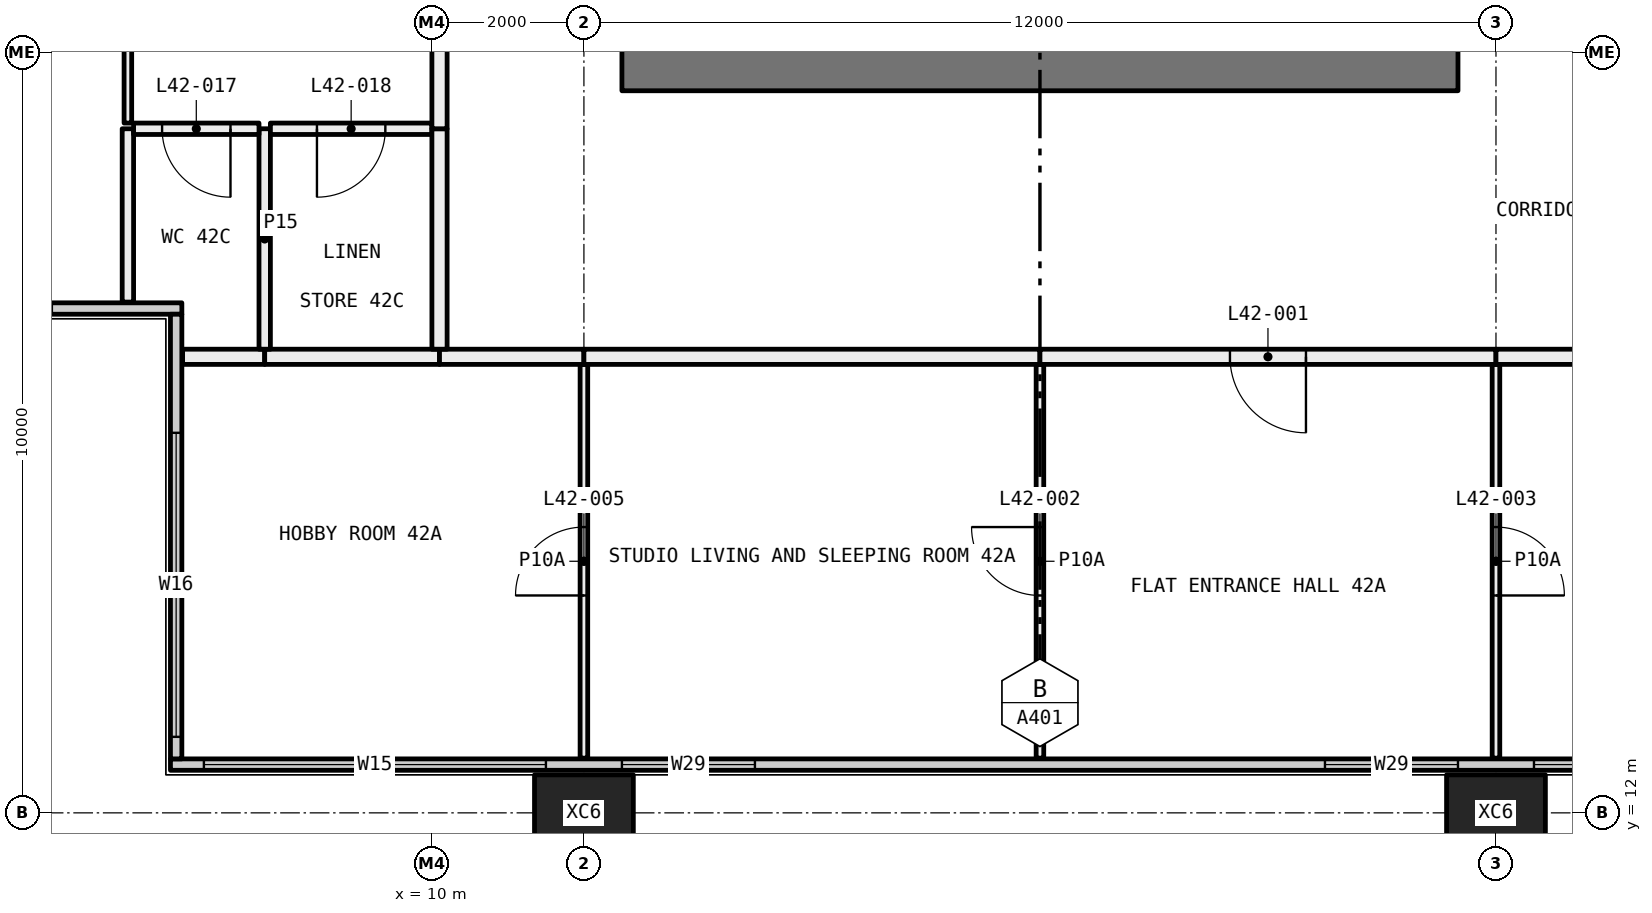
"""IFC4 building model, lengths in metres.
Left out: names, types, materials, properties, quantities, classifications, styles, units other than length and angle.
Written with IfcOpenShell. Run it as: python <this file> out.ifc"""

import sys

from ifc_helpers import new_model, si_unit, direction, frame, frame_2d, origin, origin_2d, place, context, subcontext, project, spatial, rectangle, hollow_rectangle, extrude, element, fill, save


model = new_model("IFC4")
c1 = context("Model", 3, precision=1e-05, world=origin(), true_north=direction((0.0, 1.0)))
c2 = subcontext(c1, "Body", "Model", "MODEL_VIEW")
j1 = project(units=[si_unit("LENGTHUNIT", "METRE"), si_unit("PLANEANGLEUNIT", "RADIAN")], contexts=[c1])
p1 = place(None, origin())
s1 = spatial("IfcSite", under=j1, at=p1, CompositionType="ELEMENT")
p2 = place(p1, origin())
s2 = spatial("IfcBuilding", under=s1, at=p2, CompositionType="ELEMENT")
p3 = place(p2, frame((0.0, 0.0, 161.7)))
s3 = spatial("IfcBuildingStorey", under=s2, at=p3, CompositionType="ELEMENT", Elevation=161.7)
for number, where, z_axis, x_axis in (
    (1, (12.0, 12.0, -0.4), (0.0, 0.0, 1.0), (1.0, 0.0, 0.0)),
    (2, (24.0, 12.0, -0.4), (0.0, 0.0, 1.0), (1.0, 0.0, 0.0)),
):
    element("IfcColumn", number, at=place(p3, frame(where, z_axis=z_axis, x_axis=x_axis)), inside=s3, PredefinedType="COLUMN", context=c2, shape_type="SweptSolid", body=[
        extrude(hollow_rectangle(XDim=1.3, YDim=1.0, WallThickness=0.05, at=origin_2d()), origin(), (0.0, 0.0, 1.0), 3.45),
    ])
p4 = place(p3, frame((6.56, 12.635, 0.0), z_axis=(0.0, 0.0, 1.0), x_axis=(1.0, 0.0, 0.0)))
e3 = element("IfcWall", 3, at=p4, inside=s3, PredefinedType="ELEMENTEDWALL", context=c2, shape_type="SweptSolid", body=[
    extrude(rectangle(XDim=46.88, YDim=0.15, at=frame_2d((23.44, 0.0))), origin(), (0.0, 0.0, 1.0), 3.05),
])
p5 = place(p4, frame((0.44, 0.0, 0.45)))
e4 = element("IfcOpeningElement", 4, at=p5, cuts=e3, PredefinedType="OPENING", context=c2, shape_type="SweptSolid", body=[
    extrude(rectangle(XDim=4.5, YDim=2.55, at=frame_2d((2.25, 1.275))), frame((0.0, 0.085, 0.0), z_axis=(0.0, -1.0, 0.0), x_axis=(1.0, 0.0, 0.0)), (0.0, 0.0, 1.0), 0.17),
])
p6 = place(p4, frame((5.94, 0.0, 0.45)))
e5 = element("IfcOpeningElement", 5, at=p6, cuts=e3, PredefinedType="OPENING", context=c2, shape_type="SweptSolid", body=[
    extrude(rectangle(XDim=1.75, YDim=2.55, at=frame_2d((0.875, 1.275))), frame((0.0, 0.085, 0.0), z_axis=(0.0, -1.0, 0.0), x_axis=(1.0, 0.0, 0.0)), (0.0, 0.0, 1.0), 0.17),
])
p7 = place(p4, frame((15.19, 0.0, 0.45)))
e6 = element("IfcOpeningElement", 6, at=p7, cuts=e3, PredefinedType="OPENING", context=c2, shape_type="SweptSolid", body=[
    extrude(rectangle(XDim=1.75, YDim=2.55, at=frame_2d((0.875, 1.275))), frame((0.0, 0.085, 0.0), z_axis=(0.0, -1.0, 0.0), x_axis=(1.0, 0.0, 0.0)), (0.0, 0.0, 1.0), 0.17),
])
p8 = place(p4, frame((17.94, 0.0, 0.45)))
e7 = element("IfcOpeningElement", 7, at=p8, cuts=e3, PredefinedType="OPENING", context=c2, shape_type="SweptSolid", body=[
    extrude(rectangle(XDim=1.75, YDim=2.55, at=frame_2d((0.875, 1.275))), frame((0.0, 0.085, 0.0), z_axis=(0.0, -1.0, 0.0), x_axis=(1.0, 0.0, 0.0)), (0.0, 0.0, 1.0), 0.17),
])
p9 = place(p4, frame((27.19, 0.0, 0.45)))
e8 = element("IfcOpeningElement", 8, at=p9, cuts=e3, PredefinedType="OPENING", context=c2, shape_type="SweptSolid", body=[
    extrude(rectangle(XDim=1.75, YDim=2.55, at=frame_2d((0.875, 1.275))), frame((0.0, 0.085, 0.0), z_axis=(0.0, -1.0, 0.0), x_axis=(1.0, 0.0, 0.0)), (0.0, 0.0, 1.0), 0.17),
])
p10 = place(p4, frame((29.94, 0.0, 0.45)))
e9 = element("IfcOpeningElement", 9, at=p10, cuts=e3, PredefinedType="OPENING", context=c2, shape_type="SweptSolid", body=[
    extrude(rectangle(XDim=1.75, YDim=2.55, at=frame_2d((0.875, 1.275))), frame((0.0, 0.085, 0.0), z_axis=(0.0, -1.0, 0.0), x_axis=(1.0, 0.0, 0.0)), (0.0, 0.0, 1.0), 0.17),
])
p11 = place(p4, frame((39.19, 0.0, 0.45)))
e10 = element("IfcOpeningElement", 10, at=p11, cuts=e3, PredefinedType="OPENING", context=c2, shape_type="SweptSolid", body=[
    extrude(rectangle(XDim=1.75, YDim=2.55, at=frame_2d((0.875, 1.275))), frame((0.0, 0.085, 0.0), z_axis=(0.0, -1.0, 0.0), x_axis=(1.0, 0.0, 0.0)), (0.0, 0.0, 1.0), 0.17),
])
p12 = place(p4, frame((41.94, 0.0, 0.45)))
e11 = element("IfcOpeningElement", 11, at=p12, cuts=e3, PredefinedType="OPENING", context=c2, shape_type="SweptSolid", body=[
    extrude(rectangle(XDim=4.5, YDim=2.55, at=frame_2d((2.25, 1.275))), frame((0.0, 0.085, 0.0), z_axis=(0.0, -1.0, 0.0), x_axis=(1.0, 0.0, 0.0)), (0.0, 0.0, 1.0), 0.17),
])
p13 = place(p3, frame((0.56, 18.635, 0.0), z_axis=(0.0, 0.0, 1.0), x_axis=(1.0, 0.0, 0.0)))
e12 = element("IfcWall", 12, at=p13, inside=s3, PredefinedType="ELEMENTEDWALL", context=c2, shape_type="SweptSolid", body=[
    extrude(rectangle(XDim=6.15, YDim=0.15, at=frame_2d((3.075, 0.0))), origin(), (0.0, 0.0, 1.0), 3.05),
])
p14 = place(p13, frame((0.44, 0.0, 0.45)))
e13 = element("IfcOpeningElement", 13, at=p14, cuts=e12, PredefinedType="OPENING", context=c2, shape_type="SweptSolid", body=[
    extrude(rectangle(XDim=4.0, YDim=2.55, at=frame_2d((2.0, 1.275))), frame((0.0, 0.085, 0.0), z_axis=(0.0, -1.0, 0.0), x_axis=(1.0, 0.0, 0.0)), (0.0, 0.0, 1.0), 0.17),
])
p15 = place(p3, frame((6.635, 12.71, 0.0), z_axis=(0.0, 0.0, 1.0), x_axis=(0.0, 1.0, 0.0)))
e14 = element("IfcWall", 14, at=p15, inside=s3, PredefinedType="ELEMENTEDWALL", context=c2, shape_type="SweptSolid", body=[
    extrude(rectangle(XDim=5.85, YDim=0.15, at=frame_2d((2.925, 0.0))), origin(), (0.0, 0.0, 1.0), 3.05),
])
p16 = place(p15, frame((0.29, 0.0, 0.45)))
e15 = element("IfcOpeningElement", 15, at=p16, cuts=e14, PredefinedType="OPENING", context=c2, shape_type="SweptSolid", body=[
    extrude(rectangle(XDim=4.0, YDim=2.55, at=frame_2d((2.0, 1.275))), frame((0.0, 0.085, 0.0), z_axis=(0.0, -1.0, 0.0), x_axis=(1.0, 0.0, 0.0)), (0.0, 0.0, 1.0), 0.17),
])
p17 = place(p3, frame((12.0, 12.72, 0.0), z_axis=(0.0, 0.0, 1.0), x_axis=(0.0, 1.0, 0.0)))
e16 = element("IfcWall", 16, at=p17, inside=s3, PredefinedType="PARTITIONING", context=c2, shape_type="SweptSolid", body=[
    extrude(rectangle(XDim=5.18, YDim=0.1, at=frame_2d((2.59, 0.0))), origin(), (0.0, 0.0, 1.0), 3.05),
])
p18 = place(p17, frame((2.14, 0.0, 0.0)))
e17 = element("IfcOpeningElement", 17, at=p18, cuts=e16, PredefinedType="OPENING", context=c2, shape_type="SweptSolid", body=[
    extrude(rectangle(XDim=0.9, YDim=2.1, at=frame_2d((0.45, 1.05))), frame((0.0, 0.06, 0.0), z_axis=(0.0, -1.0, 0.0), x_axis=(1.0, 0.0, 0.0)), (0.0, 0.0, 1.0), 0.12),
])
p19 = place(p3, frame((7.8, 18.0, 0.0), z_axis=(0.0, 0.0, 1.0), x_axis=(-1.0, 0.0, 0.0)))
e18 = element("IfcWall", 18, at=p19, inside=s3, PredefinedType="PARTITIONING", context=c2, shape_type="SweptSolid", body=[
    extrude(rectangle(XDim=1.08, YDim=0.2, at=frame_2d((0.54, 0.0))), origin(), (0.0, 0.0, 1.0), 3.05),
])
p20 = place(p3, frame((10.1, 18.0, 0.0), z_axis=(0.0, 0.0, 1.0), x_axis=(-1.0, 0.0, 0.0)))
e19 = element("IfcWall", 19, at=p20, inside=s3, PredefinedType="PARTITIONING", context=c2, shape_type="SweptSolid", body=[
    extrude(rectangle(XDim=2.3, YDim=0.2, at=frame_2d((1.15, 0.0))), origin(), (0.0, 0.0, 1.0), 3.05),
])
p21 = place(p3, frame((12.0, 18.0, 0.0), z_axis=(0.0, 0.0, 1.0), x_axis=(-1.0, 0.0, 0.0)))
e20 = element("IfcWall", 20, at=p21, inside=s3, PredefinedType="PARTITIONING", context=c2, shape_type="SweptSolid", body=[
    extrude(rectangle(XDim=1.9, YDim=0.2, at=frame_2d((0.95, 0.0))), origin(), (0.0, 0.0, 1.0), 3.05),
])
p22 = place(p3, frame((18.0, 12.72, 0.0), z_axis=(0.0, 0.0, 1.0), x_axis=(0.0, 1.0, 0.0)))
e21 = element("IfcWall", 21, at=p22, inside=s3, PredefinedType="PARTITIONING", context=c2, shape_type="SweptSolid", body=[
    extrude(rectangle(XDim=5.18, YDim=0.1, at=frame_2d((2.59, 0.0))), origin(), (0.0, 0.0, 1.0), 3.05),
])
p23 = place(p22, frame((2.14, 0.0, 0.0)))
e22 = element("IfcOpeningElement", 22, at=p23, cuts=e21, PredefinedType="OPENING", context=c2, shape_type="SweptSolid", body=[
    extrude(rectangle(XDim=0.9, YDim=2.1, at=frame_2d((0.45, 1.05))), frame((0.0, 0.06, 0.0), z_axis=(0.0, -1.0, 0.0), x_axis=(1.0, 0.0, 0.0)), (0.0, 0.0, 1.0), 0.12),
])
p24 = place(p3, frame((18.0, 18.0, 0.0), z_axis=(0.0, 0.0, 1.0), x_axis=(-1.0, 0.0, 0.0)))
e23 = element("IfcWall", 23, at=p24, inside=s3, PredefinedType="PARTITIONING", context=c2, shape_type="SweptSolid", body=[
    extrude(rectangle(XDim=6.0, YDim=0.2, at=frame_2d((3.0, 0.0))), origin(), (0.0, 0.0, 1.0), 3.05),
])
p25 = place(p3, frame((24.0, 12.72, 0.0), z_axis=(0.0, 0.0, 1.0), x_axis=(0.0, 1.0, 0.0)))
e24 = element("IfcWall", 24, at=p25, inside=s3, PredefinedType="PARTITIONING", context=c2, shape_type="SweptSolid", body=[
    extrude(rectangle(XDim=5.18, YDim=0.1, at=frame_2d((2.59, 0.0))), origin(), (0.0, 0.0, 1.0), 3.05),
])
p26 = place(p25, frame((2.14, 0.0, 0.0)))
e25 = element("IfcOpeningElement", 25, at=p26, cuts=e24, PredefinedType="OPENING", context=c2, shape_type="SweptSolid", body=[
    extrude(rectangle(XDim=0.9, YDim=2.1, at=frame_2d((0.45, 1.05))), frame((0.0, 0.06, 0.0), z_axis=(0.0, -1.0, 0.0), x_axis=(1.0, 0.0, 0.0)), (0.0, 0.0, 1.0), 0.12),
])
p27 = place(p3, frame((24.0, 18.0, 0.0), z_axis=(0.0, 0.0, 1.0), x_axis=(-1.0, 0.0, 0.0)))
e26 = element("IfcWall", 26, at=p27, inside=s3, PredefinedType="PARTITIONING", context=c2, shape_type="SweptSolid", body=[
    extrude(rectangle(XDim=6.0, YDim=0.2, at=frame_2d((3.0, 0.0))), origin(), (0.0, 0.0, 1.0), 3.05),
])
p28 = place(p27, frame((2.5, 0.0, 0.0)))
e27 = element("IfcOpeningElement", 27, at=p28, cuts=e26, PredefinedType="OPENING", context=c2, shape_type="SweptSolid", body=[
    extrude(rectangle(XDim=1.0, YDim=2.1, at=frame_2d((0.5, 1.05))), frame((0.0, 0.11, 0.0), z_axis=(0.0, -1.0, 0.0), x_axis=(1.0, 0.0, 0.0)), (0.0, 0.0, 1.0), 0.22),
])
p29 = place(p3, frame((30.0, 18.0, 0.0), z_axis=(0.0, 0.0, 1.0), x_axis=(-1.0, 0.0, 0.0)))
e28 = element("IfcWall", 28, at=p29, inside=s3, PredefinedType="PARTITIONING", context=c2, shape_type="SweptSolid", body=[
    extrude(rectangle(XDim=6.0, YDim=0.2, at=frame_2d((3.0, 0.0))), origin(), (0.0, 0.0, 1.0), 3.05),
])
p30 = place(p3, frame((6.0, 18.72, 0.0), z_axis=(0.0, 0.0, 1.0), x_axis=(0.0, 1.0, 0.0)))
e29 = element("IfcWall", 29, at=p30, inside=s3, PredefinedType="PARTITIONING", context=c2, shape_type="SweptSolid", body=[
    extrude(rectangle(XDim=2.28, YDim=0.15, at=frame_2d((1.14, 0.0))), origin(), (0.0, 0.0, 1.0), 3.05),
])
p31 = place(p3, frame((6.0, 21.075, 0.0), z_axis=(0.0, 0.0, 1.0), x_axis=(0.0, 1.0, 0.0)))
e30 = element("IfcWall", 30, at=p31, inside=s3, PredefinedType="PARTITIONING", context=c2, shape_type="SweptSolid", body=[
    extrude(rectangle(XDim=2.875, YDim=0.1, at=frame_2d((1.438, 0.0))), origin(), (0.0, 0.0, 1.0), 2.45),
])
p32 = place(p3, frame((7.8, 18.1, 0.0), z_axis=(0.0, 0.0, 1.0), x_axis=(0.0, 1.0, 0.0)))
e31 = element("IfcWall", 31, at=p32, inside=s3, PredefinedType="PARTITIONING", context=c2, shape_type="SweptSolid", body=[
    extrude(rectangle(XDim=2.9, YDim=0.15, at=frame_2d((1.45, 0.0))), origin(), (0.0, 0.0, 1.0), 3.05),
])
p33 = place(p3, frame((7.725, 21.0, 0.0), z_axis=(0.0, 0.0, 1.0), x_axis=(-1.0, 0.0, 0.0)))
e32 = element("IfcWall", 32, at=p33, inside=s3, PredefinedType="PARTITIONING", context=c2, shape_type="SweptSolid", body=[
    extrude(rectangle(XDim=1.65, YDim=0.15, at=frame_2d((0.825, 0.0))), origin(), (0.0, 0.0, 1.0), 3.05),
])
p34 = place(p33, frame((0.375, 0.0, 0.0)))
e33 = element("IfcOpeningElement", 33, at=p34, cuts=e32, PredefinedType="OPENING", context=c2, shape_type="SweptSolid", body=[
    extrude(rectangle(XDim=0.9, YDim=2.1, at=frame_2d((0.45, 1.05))), frame((0.0, 0.085, 0.0), z_axis=(0.0, -1.0, 0.0), x_axis=(1.0, 0.0, 0.0)), (0.0, 0.0, 1.0), 0.17),
])
p35 = place(p3, frame((10.0, 21.0, 0.0), z_axis=(0.0, 0.0, 1.0), x_axis=(-1.0, 0.0, 0.0)))
e34 = element("IfcWall", 34, at=p35, inside=s3, PredefinedType="PARTITIONING", context=c2, shape_type="SweptSolid", body=[
    extrude(rectangle(XDim=2.125, YDim=0.15, at=frame_2d((1.062, 0.0))), origin(), (0.0, 0.0, 1.0), 3.05),
])
p36 = place(p35, frame((0.613, 0.0, 0.0)))
e35 = element("IfcOpeningElement", 35, at=p36, cuts=e34, PredefinedType="OPENING", context=c2, shape_type="SweptSolid", body=[
    extrude(rectangle(XDim=0.9, YDim=2.1, at=frame_2d((0.45, 1.05))), frame((0.0, 0.085, 0.0), z_axis=(0.0, -1.0, 0.0), x_axis=(1.0, 0.0, 0.0)), (0.0, 0.0, 1.0), 0.17),
])
p37 = place(p3, frame((10.1, 18.1, 0.0), z_axis=(0.0, 0.0, 1.0), x_axis=(0.0, 1.0, 0.0)))
e36 = element("IfcWall", 36, at=p37, inside=s3, PredefinedType="PARTITIONING", context=c2, shape_type="SweptSolid", body=[
    extrude(rectangle(XDim=2.9, YDim=0.2, at=frame_2d((1.45, 0.0))), origin(), (0.0, 0.0, 1.0), 3.05),
])
p38 = place(p3, frame((10.1, 21.0, 0.0), z_axis=(0.0, 0.0, 1.0), x_axis=(0.0, 1.0, 0.0)))
e37 = element("IfcWall", 37, at=p38, inside=s3, PredefinedType="PARTITIONING", context=c2, shape_type="SweptSolid", body=[
    extrude(rectangle(XDim=3.1, YDim=0.2, at=frame_2d((1.55, 0.0))), origin(), (0.0, 0.0, 1.0), 2.45),
])
p39 = place(p38, frame((1.05, 0.0, 0.0)))
e38 = element("IfcOpeningElement", 38, at=p39, cuts=e37, PredefinedType="OPENING", context=c2, shape_type="SweptSolid", body=[
    extrude(rectangle(XDim=1.0, YDim=2.1, at=frame_2d((0.5, 1.05))), frame((0.0, 0.11, 0.0), z_axis=(0.0, -1.0, 0.0), x_axis=(1.0, 0.0, 0.0)), (0.0, 0.0, 1.0), 0.22),
])
p40 = place(p3, frame((12.5, 21.775, 0.0), z_axis=(0.0, 0.0, 1.0), x_axis=(1.0, 0.0, 0.0)))
e39 = element("IfcWall", 39, at=p40, inside=s3, PredefinedType="SHEAR", context=c2, shape_type="SweptSolid", body=[
    extrude(rectangle(XDim=11.0, YDim=0.55, at=frame_2d((5.5, 0.0))), origin(), (0.0, 0.0, 1.0), 3.05),
])
p41 = place(p5, origin())
e40 = element("IfcWindow", 40, at=p41, inside=s3, PartitioningType="SINGLE_PANEL", PredefinedType="WINDOW", context=c2, shape_type="SweptSolid", body=[
    extrude(rectangle(XDim=4.5, YDim=2.55, at=frame_2d((2.25, 1.275))), frame((0.0, 0.03, 0.0), z_axis=(0.0, -1.0, 0.0), x_axis=(1.0, 0.0, 0.0)), (0.0, 0.0, 1.0), 0.06),
])
fill(e4, e40)
p42 = place(p6, origin())
e41 = element("IfcWindow", 41, at=p42, inside=s3, PartitioningType="SINGLE_PANEL", PredefinedType="WINDOW", context=c2, shape_type="SweptSolid", body=[
    extrude(rectangle(XDim=1.75, YDim=2.55, at=frame_2d((0.875, 1.275))), frame((0.0, 0.03, 0.0), z_axis=(0.0, -1.0, 0.0), x_axis=(1.0, 0.0, 0.0)), (0.0, 0.0, 1.0), 0.06),
])
fill(e5, e41)
p43 = place(p7, origin())
e42 = element("IfcWindow", 42, at=p43, inside=s3, PartitioningType="SINGLE_PANEL", PredefinedType="WINDOW", context=c2, shape_type="SweptSolid", body=[
    extrude(rectangle(XDim=1.75, YDim=2.55, at=frame_2d((0.875, 1.275))), frame((0.0, 0.03, 0.0), z_axis=(0.0, -1.0, 0.0), x_axis=(1.0, 0.0, 0.0)), (0.0, 0.0, 1.0), 0.06),
])
fill(e6, e42)
p44 = place(p8, origin())
e43 = element("IfcWindow", 43, at=p44, inside=s3, PartitioningType="SINGLE_PANEL", PredefinedType="WINDOW", context=c2, shape_type="SweptSolid", body=[
    extrude(rectangle(XDim=1.75, YDim=2.55, at=frame_2d((0.875, 1.275))), frame((0.0, 0.03, 0.0), z_axis=(0.0, -1.0, 0.0), x_axis=(1.0, 0.0, 0.0)), (0.0, 0.0, 1.0), 0.06),
])
fill(e7, e43)
p45 = place(p16, origin())
e44 = element("IfcWindow", 44, at=p45, inside=s3, PartitioningType="SINGLE_PANEL", PredefinedType="WINDOW", context=c2, shape_type="SweptSolid", body=[
    extrude(rectangle(XDim=4.0, YDim=2.55, at=frame_2d((2.0, 1.275))), frame((0.0, 0.03, 0.0), z_axis=(0.0, -1.0, 0.0), x_axis=(1.0, 0.0, 0.0)), (0.0, 0.0, 1.0), 0.06),
])
fill(e15, e44)
p46 = place(p28, origin())
e45 = element("IfcDoor", 45, at=p46, inside=s3, OperationType="SINGLE_SWING_RIGHT", PredefinedType="DOOR", context=c2, shape_type="SweptSolid", body=[
    extrude(rectangle(XDim=1.0, YDim=2.1, at=frame_2d((0.5, 1.05))), frame((0.0, 0.025, 0.0), z_axis=(0.0, -1.0, 0.0), x_axis=(1.0, 0.0, 0.0)), (0.0, 0.0, 1.0), 0.05),
])
fill(e27, e45)
p47 = place(p23, origin())
e46 = element("IfcDoor", 46, at=p47, inside=s3, OperationType="SINGLE_SWING_LEFT", PredefinedType="DOOR", context=c2, shape_type="SweptSolid", body=[
    extrude(rectangle(XDim=0.9, YDim=2.1, at=frame_2d((0.45, 1.05))), frame((0.0, 0.025, 0.0), z_axis=(0.0, -1.0, 0.0), x_axis=(1.0, 0.0, 0.0)), (0.0, 0.0, 1.0), 0.05),
])
fill(e22, e46)
p48 = place(p26, frame((0.9, 0.0, 0.0), x_axis=(-1.0, 0.0, 0.0)))
e47 = element("IfcDoor", 47, at=p48, inside=s3, OperationType="SINGLE_SWING_LEFT", PredefinedType="DOOR", context=c2, shape_type="SweptSolid", body=[
    extrude(rectangle(XDim=0.9, YDim=2.1, at=frame_2d((0.45, 1.05))), frame((0.0, 0.025, 0.0), z_axis=(0.0, -1.0, 0.0), x_axis=(1.0, 0.0, 0.0)), (0.0, 0.0, 1.0), 0.05),
])
fill(e25, e47)
p49 = place(p18, origin())
e48 = element("IfcDoor", 48, at=p49, inside=s3, OperationType="SINGLE_SWING_RIGHT", PredefinedType="DOOR", context=c2, shape_type="SweptSolid", body=[
    extrude(rectangle(XDim=0.9, YDim=2.1, at=frame_2d((0.45, 1.05))), frame((0.0, 0.025, 0.0), z_axis=(0.0, -1.0, 0.0), x_axis=(1.0, 0.0, 0.0)), (0.0, 0.0, 1.0), 0.05),
])
fill(e17, e48)
p50 = place(p34, origin())
e49 = element("IfcDoor", 49, at=p50, inside=s3, OperationType="SINGLE_SWING_RIGHT", PredefinedType="DOOR", context=c2, shape_type="SweptSolid", body=[
    extrude(rectangle(XDim=0.9, YDim=2.1, at=frame_2d((0.45, 1.05))), frame((0.0, 0.025, 0.0), z_axis=(0.0, -1.0, 0.0), x_axis=(1.0, 0.0, 0.0)), (0.0, 0.0, 1.0), 0.05),
])
fill(e33, e49)
p51 = place(p36, origin())
e50 = element("IfcDoor", 50, at=p51, inside=s3, OperationType="SINGLE_SWING_LEFT", PredefinedType="DOOR", context=c2, shape_type="SweptSolid", body=[
    extrude(rectangle(XDim=0.9, YDim=2.1, at=frame_2d((0.45, 1.05))), frame((0.0, 0.025, 0.0), z_axis=(0.0, -1.0, 0.0), x_axis=(1.0, 0.0, 0.0)), (0.0, 0.0, 1.0), 0.05),
])
fill(e35, e50)
save(model, sys.argv[1])
